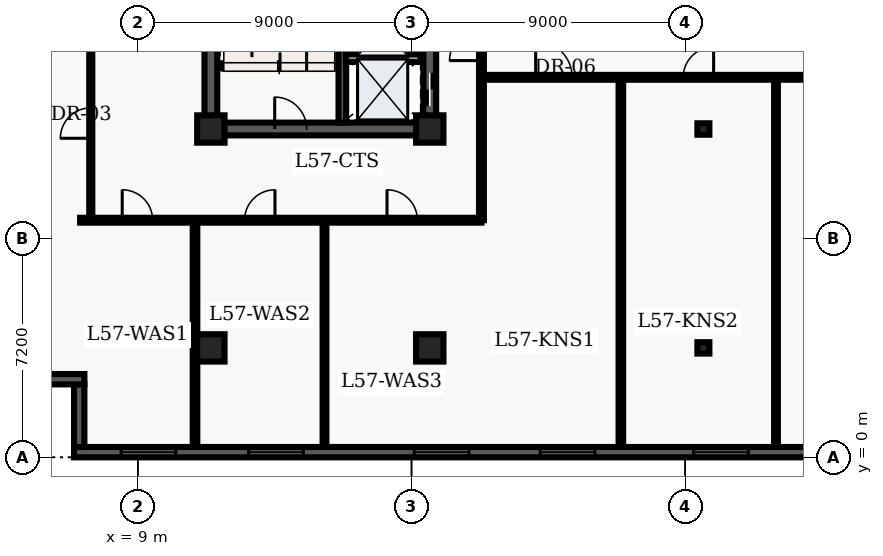
"""IFC4 building model, lengths in metres.
Left out: names, types, materials, properties, quantities, classifications, styles, units other than length and angle.
Written with IfcOpenShell. Run it as: python <this file> out.ifc"""

import sys

from ifc_helpers import new_model, entity, si_unit, converted_unit, direction, frame, origin_with_axes, origin_2d_with_axis, place, context, subcontext, project, spatial, polyline, rectangle, i_section, outline, extrude, element, fill, save


model = new_model("IFC4")
c1 = context("Model", 3, precision=1e-05, world=origin_with_axes(), true_north=direction((0.0, 1.0)))
c2 = subcontext(c1, "Body", "Model", "MODEL_VIEW")
j1 = project(units=[si_unit("LENGTHUNIT", "METRE"), converted_unit("PLANEANGLEUNIT", "DEGREE", entity("IfcPlaneAngleMeasure", 0.017), si_unit("PLANEANGLEUNIT", "RADIAN"), dimensions=[0, 0, 0, 0, 0, 0, 0])], contexts=[c1])
p1 = place(None, origin_with_axes())
s1 = spatial("IfcSite", under=j1, at=p1, CompositionType="ELEMENT")
p2 = place(p1, origin_with_axes())
s2 = spatial("IfcBuilding", under=s1, at=p2, CompositionType="ELEMENT")
p3 = place(p2, frame((0.0, 0.0, 232.5), z_axis=(0.0, 0.0, 1.0), x_axis=(1.0, 0.0, 0.0)))
s3 = spatial("IfcBuildingStorey", under=s2, at=p3, CompositionType="ELEMENT", Elevation=232.5)
p4 = place(p3, frame((11.4, 10.8, 0.0), z_axis=(0.0, 0.0, 1.0), x_axis=(0.0, 1.0, 0.0)))
e1 = element("IfcWall", 1, at=p4, inside=s3, PredefinedType="SHEAR", context=c2, shape_type="SweptSolid", body=[
    extrude(outline(polyline([(0.0, -0.21), (27.0, -0.21), (27.0, 0.21), (0.0, 0.21), (0.0, -0.21)])), origin_with_axes(), (0.0, 0.0, 1.0), 3.66),
])
p5 = place(p3, frame((11.4, 10.8, 0.0), z_axis=(0.0, 0.0, 1.0), x_axis=(1.0, 0.0, 0.0)))
e2 = element("IfcWall", 2, at=p5, inside=s3, PredefinedType="SHEAR", context=c2, shape_type="SweptSolid", body=[
    extrude(outline(polyline([(0.0, -0.21), (7.2, -0.21), (7.2, 0.21), (0.0, 0.21), (0.0, -0.21)])), origin_with_axes(), (0.0, 0.0, 1.0), 3.66),
])
p6 = place(p5, frame((2.625, 0.0, 0.0), z_axis=(0.0, 0.0, 1.0), x_axis=(1.0, 0.0, 0.0)))
e3 = element("IfcOpeningElement", 3, at=p6, cuts=e2, PredefinedType="OPENING", context=c2, shape_type="SweptSolid", body=[
    extrude(rectangle(XDim=1.05, YDim=0.44, at=origin_2d_with_axis()), origin_with_axes(), (0.0, 0.0, 1.0), 2.15),
])
p7 = place(p3, frame((18.6, 10.8, 0.0), z_axis=(0.0, 0.0, 1.0), x_axis=(0.0, 1.0, 0.0)))
e4 = element("IfcWall", 4, at=p7, inside=s3, PredefinedType="SHEAR", context=c2, shape_type="SweptSolid", body=[
    extrude(outline(polyline([(0.0, -0.21), (13.5, -0.21), (13.5, 0.21), (0.0, 0.21), (0.0, -0.21)])), origin_with_axes(), (0.0, 0.0, 1.0), 3.66),
])
p8 = place(p7, frame((1.3, 0.0, 0.0), z_axis=(0.0, 0.0, 1.0), x_axis=(1.0, 0.0, 0.0)))
e5 = element("IfcOpeningElement", 5, at=p8, cuts=e4, PredefinedType="OPENING", context=c2, shape_type="SweptSolid", body=[
    extrude(rectangle(XDim=1.1, YDim=0.44, at=origin_2d_with_axis()), origin_with_axes(), (0.0, 0.0, 1.0), 2.15),
])
p9 = place(p7, frame((3.4, 0.0, 0.0), z_axis=(0.0, 0.0, 1.0), x_axis=(1.0, 0.0, 0.0)))
e6 = element("IfcOpeningElement", 6, at=p9, cuts=e4, PredefinedType="OPENING", context=c2, shape_type="SweptSolid", body=[
    extrude(rectangle(XDim=1.1, YDim=0.44, at=origin_2d_with_axis()), origin_with_axes(), (0.0, 0.0, 1.0), 2.15),
])
p10 = place(p7, frame((11.125, 0.0, 0.0), z_axis=(0.0, 0.0, 1.0), x_axis=(1.0, 0.0, 0.0)))
e7 = element("IfcOpeningElement", 7, at=p10, cuts=e4, PredefinedType="OPENING", context=c2, shape_type="SweptSolid", body=[
    extrude(rectangle(XDim=1.05, YDim=0.44, at=origin_2d_with_axis()), origin_with_axes(), (0.0, 0.0, 1.0), 2.15),
])
p11 = place(p7, frame((6.675, 0.0, 0.0), z_axis=(0.0, 0.0, 1.0), x_axis=(1.0, 0.0, 0.0)))
e8 = element("IfcOpeningElement", 8, at=p11, cuts=e4, PredefinedType="OPENING", context=c2, shape_type="SweptSolid", body=[
    extrude(rectangle(XDim=0.95, YDim=0.44, at=origin_2d_with_axis()), origin_with_axes(), (0.0, 0.0, 1.0), 2.15),
])
p12 = place(p3, frame((15.725, 11.01, 0.0), z_axis=(0.0, 0.0, 1.0), x_axis=(0.0, 1.0, 0.0)))
e9 = element("IfcWall", 9, at=p12, inside=s3, PredefinedType="SHEAR", context=c2, shape_type="SweptSolid", body=[
    extrude(outline(polyline([(0.0, -0.125), (8.69, -0.125), (8.69, 0.125), (0.0, 0.125), (0.0, -0.125)])), origin_with_axes(), (0.0, 0.0, 1.0), 3.66),
])
for number, where, z_axis, x_axis in (
    (10, (11.4, 3.6, 0.0), (0.0, 0.0, 1.0), (1.0, 0.0, 0.0)),
    (11, (11.4, 10.8, 0.0), (0.0, 0.0, 1.0), (1.0, 0.0, 0.0)),
    (12, (18.6, 3.6, 0.0), (0.0, 0.0, 1.0), (1.0, 0.0, 0.0)),
    (13, (18.6, 10.8, 0.0), (0.0, 0.0, 1.0), (1.0, 0.0, 0.0)),
):
    element("IfcColumn", number, at=place(p3, frame(where, z_axis=z_axis, x_axis=x_axis)), inside=s3, PredefinedType="COLUMN", context=c2, shape_type="SweptSolid", body=[
        extrude(rectangle(XDim=0.9, YDim=0.9, at=origin_2d_with_axis()), origin_with_axes(), (0.0, 0.0, 1.0), 3.9),
    ])
for number, where, z_axis, x_axis in (
    (14, (27.6, 3.6, 0.0), (0.0, 0.0, 1.0), (1.0, 0.0, 0.0)),
    (15, (27.6, 10.8, 0.0), (0.0, 0.0, 1.0), (1.0, 0.0, 0.0)),
):
    element("IfcColumn", number, at=place(p3, frame(where, z_axis=z_axis, x_axis=x_axis)), inside=s3, PredefinedType="COLUMN", context=c2, shape_type="SweptSolid", body=[
        extrude(i_section(OverallWidth=0.394, OverallDepth=0.375, WebThickness=0.017, FlangeThickness=0.028, FilletRadius=0.02, at=origin_2d_with_axis()), origin_with_axes(), (0.0, 0.0, 1.0), 3.9),
    ])
p13 = place(p3, frame((15.84, 13.13, 0.0), z_axis=(0.0, 0.0, 1.0), x_axis=(1.0, 0.0, 0.0)))
e16 = element("IfcWall", 16, at=p13, inside=s3, PredefinedType="SOLIDWALL", context=c2, shape_type="SweptSolid", body=[
    extrude(outline(polyline([(0.0, -0.125), (2.46, -0.125), (2.46, 0.125), (0.0, 0.125), (0.0, -0.125)])), origin_with_axes(), (0.0, 0.0, 1.0), 2.7),
])
p14 = place(p3, frame((7.1, 7.8, 0.0), z_axis=(0.0, 0.0, 1.0), x_axis=(1.0, 0.0, 0.0)))
e17 = element("IfcWall", 17, at=p14, inside=s3, PredefinedType="PARTITIONING", context=c2, shape_type="SweptSolid", body=[
    extrude(outline(polyline([(0.0, -0.08), (13.2, -0.08), (13.2, 0.08), (0.0, 0.08), (0.0, -0.08)])), origin_with_axes(), (0.0, 0.0, 1.0), 2.7),
])
p15 = place(p14, frame((1.885, 0.0, 0.0), z_axis=(0.0, 0.0, 1.0), x_axis=(1.0, 0.0, 0.0)))
e18 = element("IfcOpeningElement", 18, at=p15, cuts=e17, PredefinedType="OPENING", context=c2, shape_type="SweptSolid", body=[
    extrude(rectangle(XDim=1.0, YDim=0.18, at=origin_2d_with_axis()), origin_with_axes(), (0.0, 0.0, 1.0), 2.15),
])
p16 = place(p14, frame((5.909, 0.0, 0.0), z_axis=(0.0, 0.0, 1.0), x_axis=(1.0, 0.0, 0.0)))
e19 = element("IfcOpeningElement", 19, at=p16, cuts=e17, PredefinedType="OPENING", context=c2, shape_type="SweptSolid", body=[
    extrude(rectangle(XDim=1.0, YDim=0.18, at=origin_2d_with_axis()), origin_with_axes(), (0.0, 0.0, 1.0), 2.15),
])
p17 = place(p14, frame((10.594, 0.0, 0.0), z_axis=(0.0, 0.0, 1.0), x_axis=(1.0, 0.0, 0.0)))
e20 = element("IfcOpeningElement", 20, at=p17, cuts=e17, PredefinedType="OPENING", context=c2, shape_type="SweptSolid", body=[
    extrude(rectangle(XDim=1.0, YDim=0.18, at=origin_2d_with_axis()), origin_with_axes(), (0.0, 0.0, 1.0), 2.15),
])
p18 = place(p3, frame((20.3, 7.8, 0.0), z_axis=(0.0, 0.0, 1.0), x_axis=(0.0, 1.0, 0.0)))
e21 = element("IfcWall", 21, at=p18, inside=s3, PredefinedType="PARTITIONING", context=c2, shape_type="SweptSolid", body=[
    extrude(outline(polyline([(0.0, -0.08), (32.7, -0.08), (32.7, 0.08), (0.0, 0.08), (0.0, -0.08)])), origin_with_axes(), (0.0, 0.0, 1.0), 2.7),
])
p19 = place(p18, frame((14.55, 0.0, 0.0), z_axis=(0.0, 0.0, 1.0), x_axis=(1.0, 0.0, 0.0)))
e22 = element("IfcOpeningElement", 22, at=p19, cuts=e21, PredefinedType="OPENING", context=c2, shape_type="SweptSolid", body=[
    extrude(rectangle(XDim=0.9, YDim=0.18, at=origin_2d_with_axis()), origin_with_axes(), (0.0, 0.0, 1.0), 2.15),
])
p20 = place(p18, frame((18.723, 0.0, 0.0), z_axis=(0.0, 0.0, 1.0), x_axis=(1.0, 0.0, 0.0)))
e23 = element("IfcOpeningElement", 23, at=p20, cuts=e21, PredefinedType="OPENING", context=c2, shape_type="SweptSolid", body=[
    extrude(rectangle(XDim=1.0, YDim=0.18, at=origin_2d_with_axis()), origin_with_axes(), (0.0, 0.0, 1.0), 2.15),
])
p21 = place(p18, frame((23.94, 0.0, 0.0), z_axis=(0.0, 0.0, 1.0), x_axis=(1.0, 0.0, 0.0)))
e24 = element("IfcOpeningElement", 24, at=p21, cuts=e21, PredefinedType="OPENING", context=c2, shape_type="SweptSolid", body=[
    extrude(rectangle(XDim=1.0, YDim=0.18, at=origin_2d_with_axis()), origin_with_axes(), (0.0, 0.0, 1.0), 2.15),
])
p22 = place(p18, frame((27.732, 0.0, 0.0), z_axis=(0.0, 0.0, 1.0), x_axis=(1.0, 0.0, 0.0)))
e25 = element("IfcOpeningElement", 25, at=p22, cuts=e21, PredefinedType="OPENING", context=c2, shape_type="SweptSolid", body=[
    extrude(rectangle(XDim=1.0, YDim=0.18, at=origin_2d_with_axis()), origin_with_axes(), (0.0, 0.0, 1.0), 2.15),
])
p23 = place(p18, frame((5.775, 0.0, 0.0), z_axis=(0.0, 0.0, 1.0), x_axis=(1.0, 0.0, 0.0)))
e26 = element("IfcOpeningElement", 26, at=p23, cuts=e21, PredefinedType="OPENING", context=c2, shape_type="SweptSolid", body=[
    extrude(rectangle(XDim=1.05, YDim=0.18, at=origin_2d_with_axis()), origin_with_axes(), (0.0, 0.0, 1.0), 2.15),
])
p24 = place(p3, frame((7.45, 7.8, 0.0), z_axis=(0.0, 0.0, 1.0), x_axis=(0.0, 1.0, 0.0)))
e27 = element("IfcWall", 27, at=p24, inside=s3, PredefinedType="PARTITIONING", context=c2, shape_type="SweptSolid", body=[
    extrude(outline(polyline([(0.0, -0.05), (32.7, -0.05), (32.7, 0.05), (0.0, 0.05), (0.0, -0.05)])), origin_with_axes(), (0.0, 0.0, 1.0), 2.7),
])
p25 = place(p24, frame((3.195, 0.0, 0.0), z_axis=(0.0, 0.0, 1.0), x_axis=(1.0, 0.0, 0.0)))
e28 = element("IfcOpeningElement", 28, at=p25, cuts=e27, PredefinedType="OPENING", context=c2, shape_type="SweptSolid", body=[
    extrude(rectangle(XDim=1.0, YDim=0.12, at=origin_2d_with_axis()), origin_with_axes(), (0.0, 0.0, 1.0), 2.15),
])
p26 = place(p24, frame((10.044, 0.0, 0.0), z_axis=(0.0, 0.0, 1.0), x_axis=(1.0, 0.0, 0.0)))
e29 = element("IfcOpeningElement", 29, at=p26, cuts=e27, PredefinedType="OPENING", context=c2, shape_type="SweptSolid", body=[
    extrude(rectangle(XDim=1.0, YDim=0.12, at=origin_2d_with_axis()), origin_with_axes(), (0.0, 0.0, 1.0), 2.15),
])
p27 = place(p24, frame((18.352, 0.0, 0.0), z_axis=(0.0, 0.0, 1.0), x_axis=(1.0, 0.0, 0.0)))
e30 = element("IfcOpeningElement", 30, at=p27, cuts=e27, PredefinedType="OPENING", context=c2, shape_type="SweptSolid", body=[
    extrude(rectangle(XDim=1.0, YDim=0.12, at=origin_2d_with_axis()), origin_with_axes(), (0.0, 0.0, 1.0), 2.15),
])
p28 = place(p24, frame((25.079, 0.0, 0.0), z_axis=(0.0, 0.0, 1.0), x_axis=(1.0, 0.0, 0.0)))
e31 = element("IfcOpeningElement", 31, at=p28, cuts=e27, PredefinedType="OPENING", context=c2, shape_type="SweptSolid", body=[
    extrude(rectangle(XDim=1.0, YDim=0.12, at=origin_2d_with_axis()), origin_with_axes(), (0.0, 0.0, 1.0), 2.15),
])
p29 = place(p24, frame((29.926, 0.0, 0.0), z_axis=(0.0, 0.0, 1.0), x_axis=(1.0, 0.0, 0.0)))
e32 = element("IfcOpeningElement", 32, at=p29, cuts=e27, PredefinedType="OPENING", context=c2, shape_type="SweptSolid", body=[
    extrude(rectangle(XDim=1.0, YDim=0.12, at=origin_2d_with_axis()), origin_with_axes(), (0.0, 0.0, 1.0), 2.15),
])
p30 = place(p3, frame((10.879, 0.335, 0.0), z_axis=(0.0, 0.0, 1.0), x_axis=(0.0, 1.0, 0.0)))
e33 = element("IfcWall", 33, at=p30, inside=s3, PredefinedType="PARTITIONING", context=c2, shape_type="SweptSolid", body=[
    extrude(outline(polyline([(0.0, -0.075), (7.365, -0.075), (7.365, 0.075), (0.0, 0.075), (0.0, -0.075)])), origin_with_axes(), (0.0, 0.0, 1.0), 2.7),
])
p31 = place(p3, frame((15.138, 0.335, 0.0), z_axis=(0.0, 0.0, 1.0), x_axis=(0.0, 1.0, 0.0)))
e34 = element("IfcWall", 34, at=p31, inside=s3, PredefinedType="PARTITIONING", context=c2, shape_type="SweptSolid", body=[
    extrude(outline(polyline([(0.0, -0.062), (7.365, -0.062), (7.365, 0.062), (0.0, 0.062), (0.0, -0.062)])), origin_with_axes(), (0.0, 0.0, 1.0), 2.7),
])
p32 = place(p3, frame((20.3, 12.5, 0.0), z_axis=(0.0, 0.0, 1.0), x_axis=(1.0, 0.0, 0.0)))
e35 = element("IfcWall", 35, at=p32, inside=s3, PredefinedType="PARTITIONING", context=c2, shape_type="SweptSolid", body=[
    extrude(outline(polyline([(0.0, -0.08), (16.05, -0.08), (16.05, 0.08), (0.0, 0.08), (0.0, -0.08)])), origin_with_axes(), (0.0, 0.0, 1.0), 2.7),
])
p33 = place(p32, frame((2.383, 0.0, 0.0), z_axis=(0.0, 0.0, 1.0), x_axis=(1.0, 0.0, 0.0)))
e36 = element("IfcOpeningElement", 36, at=p33, cuts=e35, PredefinedType="OPENING", context=c2, shape_type="SweptSolid", body=[
    extrude(rectangle(XDim=1.2, YDim=0.18, at=origin_2d_with_axis()), origin_with_axes(), (0.0, 0.0, 1.0), 2.2),
])
p34 = place(p32, frame((7.137, 0.0, 0.0), z_axis=(0.0, 0.0, 1.0), x_axis=(1.0, 0.0, 0.0)))
e37 = element("IfcOpeningElement", 37, at=p34, cuts=e35, PredefinedType="OPENING", context=c2, shape_type="SweptSolid", body=[
    extrude(rectangle(XDim=1.0, YDim=0.18, at=origin_2d_with_axis()), origin_with_axes(), (0.0, 0.0, 1.0), 2.15),
])
p35 = place(p32, frame((12.829, 0.0, 0.0), z_axis=(0.0, 0.0, 1.0), x_axis=(1.0, 0.0, 0.0)))
e38 = element("IfcOpeningElement", 38, at=p35, cuts=e35, PredefinedType="OPENING", context=c2, shape_type="SweptSolid", body=[
    extrude(rectangle(XDim=1.0, YDim=0.18, at=origin_2d_with_axis()), origin_with_axes(), (0.0, 0.0, 1.0), 2.15),
])
p36 = place(p3, frame((24.886, 0.335, 0.0), z_axis=(0.0, 0.0, 1.0), x_axis=(0.0, 1.0, 0.0)))
e39 = element("IfcWall", 39, at=p36, inside=s3, PredefinedType="PARTITIONING", context=c2, shape_type="SweptSolid", body=[
    extrude(outline(polyline([(0.0, -0.075), (12.045, -0.075), (12.045, 0.075), (0.0, 0.075), (0.0, -0.075)])), origin_with_axes(), (0.0, 0.0, 1.0), 2.7),
])
p37 = place(p3, frame((29.988, 0.335, 0.0), z_axis=(0.0, 0.0, 1.0), x_axis=(0.0, 1.0, 0.0)))
e40 = element("IfcWall", 40, at=p37, inside=s3, PredefinedType="PARTITIONING", context=c2, shape_type="SweptSolid", body=[
    extrude(outline(polyline([(0.0, -0.062), (12.045, -0.062), (12.045, 0.062), (0.0, 0.062), (0.0, -0.062)])), origin_with_axes(), (0.0, 0.0, 1.0), 2.7),
])
p38 = place(p3, frame((49.46, 0.17, 0.0), z_axis=(0.0, 0.0, 1.0), x_axis=(-1.0, 0.0, 0.0)))
e41 = element("IfcWall", 41, at=p38, inside=s3, PredefinedType="SOLIDWALL", context=c2, shape_type="SweptSolid", body=[
    extrude(outline(polyline([(0.0, -0.17), (42.56, -0.17), (42.56, 0.17), (0.0, 0.17), (0.0, -0.17)])), origin_with_axes(), (0.0, 0.0, 1.0), 3.66),
])
p39 = place(p38, frame((2.898, 0.0, 0.45), z_axis=(0.0, 0.0, 1.0), x_axis=(1.0, 0.0, 0.0)))
e42 = element("IfcOpeningElement", 42, at=p39, cuts=e41, PredefinedType="OPENING", context=c2, shape_type="SweptSolid", body=[
    extrude(rectangle(XDim=1.8, YDim=0.36, at=origin_2d_with_axis()), origin_with_axes(), (0.0, 0.0, 1.0), 2.1),
])
p40 = place(p38, frame((7.493, 0.0, 0.45), z_axis=(0.0, 0.0, 1.0), x_axis=(1.0, 0.0, 0.0)))
e43 = element("IfcOpeningElement", 43, at=p40, cuts=e41, PredefinedType="OPENING", context=c2, shape_type="SweptSolid", body=[
    extrude(rectangle(XDim=1.8, YDim=0.36, at=origin_2d_with_axis()), origin_with_axes(), (0.0, 0.0, 1.0), 2.1),
])
p41 = place(p38, frame((12.089, 0.0, 0.45), z_axis=(0.0, 0.0, 1.0), x_axis=(1.0, 0.0, 0.0)))
e44 = element("IfcOpeningElement", 44, at=p41, cuts=e41, PredefinedType="OPENING", context=c2, shape_type="SweptSolid", body=[
    extrude(rectangle(XDim=1.8, YDim=0.36, at=origin_2d_with_axis()), origin_with_axes(), (0.0, 0.0, 1.0), 2.1),
])
p42 = place(p38, frame((16.684, 0.0, 0.45), z_axis=(0.0, 0.0, 1.0), x_axis=(1.0, 0.0, 0.0)))
e45 = element("IfcOpeningElement", 45, at=p42, cuts=e41, PredefinedType="OPENING", context=c2, shape_type="SweptSolid", body=[
    extrude(rectangle(XDim=1.8, YDim=0.36, at=origin_2d_with_axis()), origin_with_axes(), (0.0, 0.0, 1.0), 2.1),
])
p43 = place(p38, frame((21.28, 0.0, 0.45), z_axis=(0.0, 0.0, 1.0), x_axis=(1.0, 0.0, 0.0)))
e46 = element("IfcOpeningElement", 46, at=p43, cuts=e41, PredefinedType="OPENING", context=c2, shape_type="SweptSolid", body=[
    extrude(rectangle(XDim=1.8, YDim=0.36, at=origin_2d_with_axis()), origin_with_axes(), (0.0, 0.0, 1.0), 2.1),
])
p44 = place(p38, frame((26.326, 0.0, 0.45), z_axis=(0.0, 0.0, 1.0), x_axis=(1.0, 0.0, 0.0)))
e47 = element("IfcOpeningElement", 47, at=p44, cuts=e41, PredefinedType="OPENING", context=c2, shape_type="SweptSolid", body=[
    extrude(rectangle(XDim=1.8, YDim=0.36, at=origin_2d_with_axis()), origin_with_axes(), (0.0, 0.0, 1.0), 2.1),
])
p45 = place(p38, frame((30.471, 0.0, 0.45), z_axis=(0.0, 0.0, 1.0), x_axis=(1.0, 0.0, 0.0)))
e48 = element("IfcOpeningElement", 48, at=p45, cuts=e41, PredefinedType="OPENING", context=c2, shape_type="SweptSolid", body=[
    extrude(rectangle(XDim=1.8, YDim=0.36, at=origin_2d_with_axis()), origin_with_axes(), (0.0, 0.0, 1.0), 2.1),
])
p46 = place(p38, frame((35.917, 0.0, 0.45), z_axis=(0.0, 0.0, 1.0), x_axis=(1.0, 0.0, 0.0)))
e49 = element("IfcOpeningElement", 49, at=p46, cuts=e41, PredefinedType="OPENING", context=c2, shape_type="SweptSolid", body=[
    extrude(rectangle(XDim=1.8, YDim=0.36, at=origin_2d_with_axis()), origin_with_axes(), (0.0, 0.0, 1.0), 2.1),
])
p47 = place(p38, frame((40.112, 0.0, 0.45), z_axis=(0.0, 0.0, 1.0), x_axis=(1.0, 0.0, 0.0)))
e50 = element("IfcOpeningElement", 50, at=p47, cuts=e41, PredefinedType="OPENING", context=c2, shape_type="SweptSolid", body=[
    extrude(rectangle(XDim=1.8, YDim=0.36, at=origin_2d_with_axis()), origin_with_axes(), (0.0, 0.0, 1.0), 2.1),
])
p48 = place(p3, frame((7.07, 0.34, 0.0), z_axis=(0.0, 0.0, 1.0), x_axis=(0.0, 1.0, 0.0)))
e51 = element("IfcWall", 51, at=p48, inside=s3, PredefinedType="SOLIDWALL", context=c2, shape_type="SweptSolid", body=[
    extrude(outline(polyline([(0.0, -0.17), (2.06, -0.17), (2.06, 0.17), (0.0, 0.17), (0.0, -0.17)])), origin_with_axes(), (0.0, 0.0, 1.0), 3.66),
])
p49 = place(p3, frame((7.24, 2.57, 0.0), z_axis=(0.0, 0.0, 1.0), x_axis=(-1.0, 0.0, 0.0)))
e52 = element("IfcWall", 52, at=p49, inside=s3, PredefinedType="SOLIDWALL", context=c2, shape_type="SweptSolid", body=[
    extrude(outline(polyline([(0.0, -0.17), (2.74, -0.17), (2.74, 0.17), (0.0, 0.17), (0.0, -0.17)])), origin_with_axes(), (0.0, 0.0, 1.0), 3.66),
])
p50 = place(p7, frame((1.3, 0.0, 0.0), z_axis=(0.0, 0.0, 1.0), x_axis=(1.0, 0.0, 0.0)))
e53 = element("IfcDoor", 53, at=p50, inside=s3, OperationType="SLIDING_TO_LEFT", PredefinedType="DOOR", context=c2, shape_type="SweptSolid", body=[
    extrude(rectangle(XDim=1.1, YDim=0.09, at=origin_2d_with_axis()), origin_with_axes(), (0.0, 0.0, 1.0), 2.15),
])
fill(e5, e53)
p51 = place(p5, frame((2.625, 0.0, 0.0), z_axis=(0.0, 0.0, 1.0), x_axis=(1.0, 0.0, 0.0)))
e54 = element("IfcDoor", 54, at=p51, inside=s3, OperationType="SINGLE_SWING_LEFT", PredefinedType="DOOR", context=c2, shape_type="SweptSolid", body=[
    extrude(rectangle(XDim=1.05, YDim=0.09, at=origin_2d_with_axis()), origin_with_axes(), (0.0, 0.0, 1.0), 2.15),
])
fill(e3, e54)
p52 = place(p24, frame((3.195, 0.0, 0.0), z_axis=(0.0, 0.0, 1.0), x_axis=(1.0, 0.0, 0.0)))
e55 = element("IfcDoor", 55, at=p52, inside=s3, OperationType="SINGLE_SWING_LEFT", PredefinedType="DOOR", context=c2, shape_type="SweptSolid", body=[
    extrude(rectangle(XDim=1.0, YDim=0.06, at=origin_2d_with_axis()), origin_with_axes(), (0.0, 0.0, 1.0), 2.15),
])
fill(e28, e55)
p53 = place(p14, frame((1.885, 0.0, 0.0), z_axis=(0.0, 0.0, 1.0), x_axis=(1.0, 0.0, 0.0)))
e56 = element("IfcDoor", 56, at=p53, inside=s3, OperationType="SINGLE_SWING_LEFT", PredefinedType="DOOR", context=c2, shape_type="SweptSolid", body=[
    extrude(rectangle(XDim=1.0, YDim=0.09, at=origin_2d_with_axis()), origin_with_axes(), (0.0, 0.0, 1.0), 2.15),
])
fill(e18, e56)
p54 = place(p14, frame((5.909, 0.0, 0.0), z_axis=(0.0, 0.0, 1.0), x_axis=(1.0, 0.0, 0.0)))
e57 = element("IfcDoor", 57, at=p54, inside=s3, OperationType="SINGLE_SWING_RIGHT", PredefinedType="DOOR", context=c2, shape_type="SweptSolid", body=[
    extrude(rectangle(XDim=1.0, YDim=0.09, at=origin_2d_with_axis()), origin_with_axes(), (0.0, 0.0, 1.0), 2.15),
])
fill(e19, e57)
p55 = place(p14, frame((10.594, 0.0, 0.0), z_axis=(0.0, 0.0, 1.0), x_axis=(1.0, 0.0, 0.0)))
e58 = element("IfcDoor", 58, at=p55, inside=s3, OperationType="SINGLE_SWING_LEFT", PredefinedType="DOOR", context=c2, shape_type="SweptSolid", body=[
    extrude(rectangle(XDim=1.0, YDim=0.09, at=origin_2d_with_axis()), origin_with_axes(), (0.0, 0.0, 1.0), 2.15),
])
fill(e20, e58)
p56 = place(p18, frame((5.775, 0.0, 0.0), z_axis=(0.0, 0.0, 1.0), x_axis=(1.0, 0.0, 0.0)))
e59 = element("IfcDoor", 59, at=p56, inside=s3, OperationType="SINGLE_SWING_LEFT", PredefinedType="DOOR", context=c2, shape_type="SweptSolid", body=[
    extrude(rectangle(XDim=1.05, YDim=0.09, at=origin_2d_with_axis()), origin_with_axes(), (0.0, 0.0, 1.0), 2.15),
])
fill(e26, e59)
p57 = place(p32, frame((2.383, 0.0, 0.0), z_axis=(0.0, 0.0, 1.0), x_axis=(1.0, 0.0, 0.0)))
e60 = element("IfcDoor", 60, at=p57, inside=s3, OperationType="SINGLE_SWING_LEFT", PredefinedType="DOOR", context=c2, shape_type="SweptSolid", body=[
    extrude(rectangle(XDim=1.2, YDim=0.09, at=origin_2d_with_axis()), origin_with_axes(), (0.0, 0.0, 1.0), 2.2),
])
fill(e36, e60)
p58 = place(p32, frame((7.137, 0.0, 0.0), z_axis=(0.0, 0.0, 1.0), x_axis=(1.0, 0.0, 0.0)))
e61 = element("IfcDoor", 61, at=p58, inside=s3, OperationType="SINGLE_SWING_RIGHT", PredefinedType="DOOR", context=c2, shape_type="SweptSolid", body=[
    extrude(rectangle(XDim=1.0, YDim=0.09, at=origin_2d_with_axis()), origin_with_axes(), (0.0, 0.0, 1.0), 2.15),
])
fill(e37, e61)
p59 = place(p38, frame((21.28, 0.0, 0.45), z_axis=(0.0, 0.0, 1.0), x_axis=(1.0, 0.0, 0.0)))
e62 = element("IfcWindow", 62, at=p59, inside=s3, PredefinedType="WINDOW", context=c2, shape_type="SweptSolid", body=[
    extrude(rectangle(XDim=1.8, YDim=0.09, at=origin_2d_with_axis()), origin_with_axes(), (0.0, 0.0, 1.0), 2.1),
])
fill(e46, e62)
p60 = place(p38, frame((26.326, 0.0, 0.45), z_axis=(0.0, 0.0, 1.0), x_axis=(1.0, 0.0, 0.0)))
e63 = element("IfcWindow", 63, at=p60, inside=s3, PredefinedType="WINDOW", context=c2, shape_type="SweptSolid", body=[
    extrude(rectangle(XDim=1.8, YDim=0.09, at=origin_2d_with_axis()), origin_with_axes(), (0.0, 0.0, 1.0), 2.1),
])
fill(e47, e63)
p61 = place(p38, frame((30.471, 0.0, 0.45), z_axis=(0.0, 0.0, 1.0), x_axis=(1.0, 0.0, 0.0)))
e64 = element("IfcWindow", 64, at=p61, inside=s3, PredefinedType="WINDOW", context=c2, shape_type="SweptSolid", body=[
    extrude(rectangle(XDim=1.8, YDim=0.09, at=origin_2d_with_axis()), origin_with_axes(), (0.0, 0.0, 1.0), 2.1),
])
fill(e48, e64)
p62 = place(p38, frame((35.917, 0.0, 0.45), z_axis=(0.0, 0.0, 1.0), x_axis=(1.0, 0.0, 0.0)))
e65 = element("IfcWindow", 65, at=p62, inside=s3, PredefinedType="WINDOW", context=c2, shape_type="SweptSolid", body=[
    extrude(rectangle(XDim=1.8, YDim=0.09, at=origin_2d_with_axis()), origin_with_axes(), (0.0, 0.0, 1.0), 2.1),
])
fill(e49, e65)
p63 = place(p38, frame((40.112, 0.0, 0.45), z_axis=(0.0, 0.0, 1.0), x_axis=(1.0, 0.0, 0.0)))
e66 = element("IfcWindow", 66, at=p63, inside=s3, PredefinedType="WINDOW", context=c2, shape_type="SweptSolid", body=[
    extrude(rectangle(XDim=1.8, YDim=0.09, at=origin_2d_with_axis()), origin_with_axes(), (0.0, 0.0, 1.0), 2.1),
])
fill(e50, e66)
save(model, sys.argv[1])
